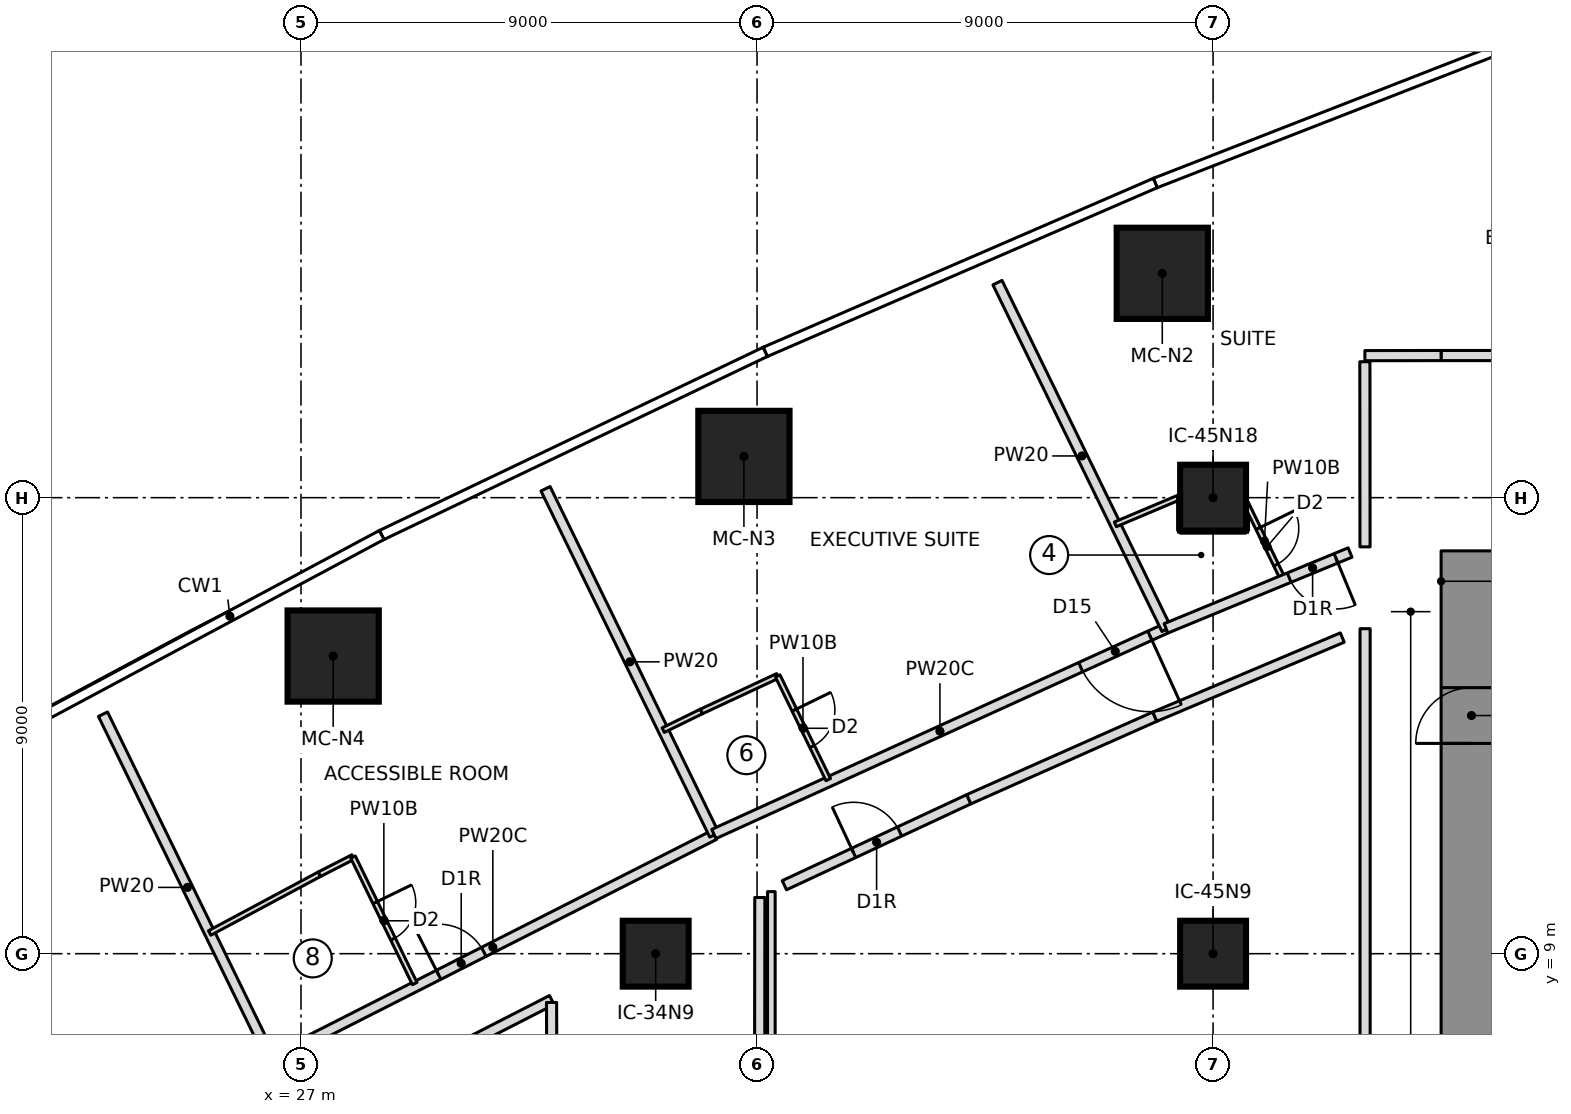
"""IFC4 building model, lengths in metres.
Left out: names, types, materials, properties, quantities, classifications, styles, units other than length and angle.
Written with IfcOpenShell. Run it as: python <this file> out.ifc"""

import sys

from ifc_helpers import new_model, si_unit, direction, frame, frame_2d, origin, origin_2d, place, context, subcontext, project, spatial, rectangle, extrude, element, fill, save


model = new_model("IFC4")
c1 = context("Model", 3, precision=1e-05, world=origin(), true_north=direction((0.0, 1.0)))
c2 = subcontext(c1, "Body", "Model", "MODEL_VIEW")
j1 = project(units=[si_unit("LENGTHUNIT", "METRE"), si_unit("PLANEANGLEUNIT", "RADIAN")], contexts=[c1])
p1 = place(None, origin())
s1 = spatial("IfcSite", under=j1, at=p1, CompositionType="ELEMENT")
p2 = place(p1, origin())
s2 = spatial("IfcBuilding", under=s1, at=p2, CompositionType="ELEMENT")
p3 = place(p2, frame((0.0, 0.0, 64.45)))
s3 = spatial("IfcBuildingStorey", under=s2, at=p3, CompositionType="ELEMENT", Elevation=64.45)
p4 = place(p3, frame((50.1, 6.65, 0.0), z_axis=(0.0, 0.0, 1.0), x_axis=(0.0, 1.0, 0.0)))
e1 = element("IfcWall", 1, at=p4, inside=s3, PredefinedType="SHEAR", context=c2, shape_type="SweptSolid", body=[
    extrude(rectangle(XDim=10.3, YDim=1.2, at=frame_2d((5.15, 0.0))), origin(), (0.0, 0.0, 1.0), 3.55),
])
p5 = place(p4, frame((6.5, 0.0, 0.0)))
e2 = element("IfcOpeningElement", 2, at=p5, cuts=e1, PredefinedType="OPENING", context=c2, shape_type="SweptSolid", body=[
    extrude(rectangle(XDim=1.1, YDim=2.1, at=frame_2d((0.55, 1.05))), frame((0.0, 0.61, 0.0), z_axis=(0.0, -1.0, 0.0), x_axis=(1.0, 0.0, 0.0)), (0.0, 0.0, 1.0), 1.22),
])
for number, where, z_axis, x_axis in (
    (3, (43.998, 22.428, 0.0), (0.0, 0.0, 1.0), (1.0, 0.0, 0.0)),
    (4, (35.741, 18.814, 0.0), (0.0, 0.0, 1.0), (1.0, 0.0, 0.0)),
    (5, (27.635, 14.874, 0.0), (0.0, 0.0, 1.0), (1.0, 0.0, 0.0)),
):
    element("IfcColumn", number, at=place(p3, frame(where, z_axis=z_axis, x_axis=x_axis)), inside=s3, PredefinedType="COLUMN", context=c2, shape_type="SweptSolid", body=[
        extrude(rectangle(XDim=1.8, YDim=1.8, at=origin_2d()), origin(), (0.0, 0.0, 1.0), 3.55),
    ])
for number, where, z_axis, x_axis in (
    (6, (34.0, 9.0, 0.0), (0.0, 0.0, 1.0), (1.0, 0.0, 0.0)),
    (7, (45.0, 9.0, 0.0), (0.0, 0.0, 1.0), (1.0, 0.0, 0.0)),
    (8, (45.0, 18.0, 0.0), (0.0, 0.0, 1.0), (1.0, 0.0, 0.0)),
):
    element("IfcColumn", number, at=place(p3, frame(where, z_axis=z_axis, x_axis=x_axis)), inside=s3, PredefinedType="COLUMN", context=c2, shape_type="SweptSolid", body=[
        extrude(rectangle(XDim=1.3, YDim=1.3, at=origin_2d()), origin(), (0.0, 0.0, 1.0), 3.55),
    ])
p6 = place(p3, frame((26.425, 6.89, 0.0), z_axis=(0.0, 0.0, 1.0), x_axis=(-0.438202895602, 0.898876088394, 0.0)))
e9 = element("IfcWall", 9, at=p6, inside=s3, PredefinedType="PARTITIONING", context=c2, shape_type="SweptSolid", body=[
    extrude(rectangle(XDim=7.605, YDim=0.2, at=frame_2d((3.803, 0.0))), origin(), (0.0, 0.0, 1.0), 3.25),
])
p7 = place(p3, frame((26.417, 6.908, 0.0), z_axis=(0.0, 0.0, 1.0), x_axis=(0.891700643128, 0.452625632334, 0.0)))
e10 = element("IfcWall", 10, at=p7, inside=s3, PredefinedType="PARTITIONING", context=c2, shape_type="SweptSolid", body=[
    extrude(rectangle(XDim=9.801, YDim=0.2, at=frame_2d((4.901, 0.0))), origin(), (0.0, 0.0, 1.0), 3.25),
])
p8 = place(p7, frame((3.7, 0.0, 0.0)))
e11 = element("IfcOpeningElement", 11, at=p8, cuts=e10, PredefinedType="OPENING", context=c2, shape_type="SweptSolid", body=[
    extrude(rectangle(XDim=1.0, YDim=2.1, at=frame_2d((0.5, 1.05))), frame((0.0, 0.11, 0.0), z_axis=(0.0, -1.0, 0.0), x_axis=(1.0, 0.0, 0.0)), (0.0, 0.0, 1.0), 0.22),
])
p9 = place(p3, frame((25.198, 9.409, 0.0), z_axis=(0.0, 0.0, 1.0), x_axis=(0.881658684569, 0.471887660279, 0.0)))
e12 = element("IfcWall", 12, at=p9, inside=s3, PredefinedType="PARTITIONING", context=c2, shape_type="SweptSolid", body=[
    extrude(rectangle(XDim=2.457, YDim=0.1, at=frame_2d((1.228, 0.0))), origin(), (0.0, 0.0, 1.0), 3.25),
])
p10 = place(p3, frame((27.363, 10.568, 0.0), z_axis=(0.0, 0.0, 1.0), x_axis=(0.890195653003, 0.455578422858, 0.0)))
e13 = element("IfcWall", 13, at=p10, inside=s3, PredefinedType="PARTITIONING", context=c2, shape_type="SweptSolid", body=[
    extrude(rectangle(XDim=0.745, YDim=0.1, at=frame_2d((0.373, 0.0))), origin(), (0.0, 0.0, 1.0), 3.25),
])
p11 = place(p3, frame((28.027, 10.907, 0.0), z_axis=(0.0, 0.0, 1.0), x_axis=(0.438189818179, -0.898882463531, 0.0)))
e14 = element("IfcWall", 14, at=p11, inside=s3, PredefinedType="PARTITIONING", context=c2, shape_type="SweptSolid", body=[
    extrude(rectangle(XDim=2.777, YDim=0.1, at=frame_2d((1.389, 0.0))), origin(), (0.0, 0.0, 1.0), 3.25),
])
p12 = place(p11, frame((1.0, 0.0, 0.0)))
e15 = element("IfcOpeningElement", 15, at=p12, cuts=e14, PredefinedType="OPENING", context=c2, shape_type="SweptSolid", body=[
    extrude(rectangle(XDim=0.8, YDim=2.1, at=frame_2d((0.4, 1.05))), frame((0.0, 0.06, 0.0), z_axis=(0.0, -1.0, 0.0), x_axis=(1.0, 0.0, 0.0)), (0.0, 0.0, 1.0), 0.12),
])
p13 = place(p3, frame((35.156, 11.344, 0.0), z_axis=(0.0, 0.0, 1.0), x_axis=(-0.438196407286, 0.898879251425, 0.0)))
e16 = element("IfcWall", 16, at=p13, inside=s3, PredefinedType="PARTITIONING", context=c2, shape_type="SweptSolid", body=[
    extrude(rectangle(XDim=7.6, YDim=0.2, at=frame_2d((3.8, 0.0))), origin(), (0.0, 0.0, 1.0), 3.25),
])
p14 = place(p3, frame((44.072, 15.421, 0.0), z_axis=(0.0, 0.0, 1.0), x_axis=(-0.910287143541, -0.413977434534, 0.0)))
e17 = element("IfcWall", 17, at=p14, inside=s3, PredefinedType="PARTITIONING", context=c2, shape_type="SweptSolid", body=[
    extrude(rectangle(XDim=9.803, YDim=0.2, at=frame_2d((4.902, 0.0))), origin(), (0.0, 0.0, 1.0), 3.25),
])
p15 = place(p14, frame((0.35, 0.0, 0.0)))
e18 = element("IfcOpeningElement", 18, at=p15, cuts=e17, PredefinedType="OPENING", context=c2, shape_type="SweptSolid", body=[
    extrude(rectangle(XDim=1.5, YDim=2.1, at=frame_2d((0.75, 1.05))), frame((0.0, 0.11, 0.0), z_axis=(0.0, -1.0, 0.0), x_axis=(1.0, 0.0, 0.0)), (0.0, 0.0, 1.0), 0.22),
])
p16 = place(p3, frame((34.148, 13.412, 0.0), z_axis=(0.0, 0.0, 1.0), x_axis=(0.89828999443, 0.43940310184, 0.0)))
e19 = element("IfcWall", 19, at=p16, inside=s3, PredefinedType="PARTITIONING", context=c2, shape_type="SweptSolid", body=[
    extrude(rectangle(XDim=0.84, YDim=0.1, at=frame_2d((0.42, 0.0))), origin(), (0.0, 0.0, 1.0), 3.25),
])
p17 = place(p3, frame((34.903, 13.781, 0.0), z_axis=(0.0, 0.0, 1.0), x_axis=(0.906434605418, 0.422346192242, 0.0)))
e20 = element("IfcWall", 20, at=p17, inside=s3, PredefinedType="PARTITIONING", context=c2, shape_type="SweptSolid", body=[
    extrude(rectangle(XDim=1.661, YDim=0.1, at=frame_2d((0.83, 0.0))), origin(), (0.0, 0.0, 1.0), 3.25),
])
p18 = place(p3, frame((36.408, 14.482, 0.0), z_axis=(0.0, 0.0, 1.0), x_axis=(0.438271544149, -0.898842618921, 0.0)))
e21 = element("IfcWall", 21, at=p18, inside=s3, PredefinedType="PARTITIONING", context=c2, shape_type="SweptSolid", body=[
    extrude(rectangle(XDim=2.277, YDim=0.1, at=frame_2d((1.139, 0.0))), origin(), (0.0, 0.0, 1.0), 3.25),
])
p19 = place(p18, frame((0.75, 0.0, 0.0)))
e22 = element("IfcOpeningElement", 22, at=p19, cuts=e21, PredefinedType="OPENING", context=c2, shape_type="SweptSolid", body=[
    extrude(rectangle(XDim=0.8, YDim=2.1, at=frame_2d((0.4, 1.05))), frame((0.0, 0.06, 0.0), z_axis=(0.0, -1.0, 0.0), x_axis=(1.0, 0.0, 0.0)), (0.0, 0.0, 1.0), 0.12),
])
p20 = place(p3, frame((44.08, 15.403, 0.0), z_axis=(0.0, 0.0, 1.0), x_axis=(-0.438196739796, 0.898879089328, 0.0)))
e23 = element("IfcWall", 23, at=p20, inside=s3, PredefinedType="PARTITIONING", context=c2, shape_type="SweptSolid", body=[
    extrude(rectangle(XDim=7.611, YDim=0.2, at=frame_2d((3.806, 0.0))), origin(), (0.0, 0.0, 1.0), 3.25),
])
p21 = place(p3, frame((43.071, 17.473, 0.0), z_axis=(0.0, 0.0, 1.0), x_axis=(0.921313965742, 0.388819465214, 0.0)))
e24 = element("IfcWall", 24, at=p21, inside=s3, PredefinedType="PARTITIONING", context=c2, shape_type="SweptSolid", body=[
    extrude(rectangle(XDim=1.388, YDim=0.1, at=frame_2d((0.694, 0.0))), origin(), (0.0, 0.0, 1.0), 3.25),
])
p22 = place(p3, frame((44.35, 18.013, 0.0), z_axis=(0.0, 0.0, 1.0), x_axis=(0.0, -1.0, 0.0)))
e25 = element("IfcWall", 25, at=p22, inside=s3, PredefinedType="PARTITIONING", context=c2, shape_type="SweptSolid", body=[
    extrude(rectangle(XDim=0.661, YDim=0.1, at=frame_2d((0.331, 0.0))), origin(), (0.0, 0.0, 1.0), 3.25),
])
p23 = place(p3, frame((44.352, 17.35, 0.0), z_axis=(0.0, 0.0, 1.0), x_axis=(1.0, 0.0, 0.0)))
e26 = element("IfcWall", 26, at=p23, inside=s3, PredefinedType="PARTITIONING", context=c2, shape_type="SweptSolid", body=[
    extrude(rectangle(XDim=1.296, YDim=0.1, at=frame_2d((0.648, 0.0))), origin(), (0.0, 0.0, 1.0), 3.25),
])
p24 = place(p3, frame((45.65, 17.352, 0.0), z_axis=(0.0, 0.0, 1.0), x_axis=(0.0, 1.0, 0.0)))
e27 = element("IfcWall", 27, at=p24, inside=s3, PredefinedType="PARTITIONING", context=c2, shape_type="SweptSolid", body=[
    extrude(rectangle(XDim=0.536, YDim=0.1, at=frame_2d((0.268, 0.0))), origin(), (0.0, 0.0, 1.0), 3.25),
])
p25 = place(p3, frame((45.65, 17.888, 0.0), z_axis=(0.0, 0.0, 1.0), x_axis=(0.438301838547, -0.89882784688, 0.0)))
e28 = element("IfcWall", 28, at=p25, inside=s3, PredefinedType="PARTITIONING", context=c2, shape_type="SweptSolid", body=[
    extrude(rectangle(XDim=1.659, YDim=0.1, at=frame_2d((0.829, 0.0))), origin(), (0.0, 0.0, 1.0), 3.25),
])
p26 = place(p25, frame((0.55, 0.0, 0.0)))
e29 = element("IfcOpeningElement", 29, at=p26, cuts=e28, PredefinedType="OPENING", context=c2, shape_type="SweptSolid", body=[
    extrude(rectangle(XDim=0.8, YDim=2.1, at=frame_2d((0.4, 1.05))), frame((0.0, 0.06, 0.0), z_axis=(0.0, -1.0, 0.0), x_axis=(1.0, 0.0, 0.0)), (0.0, 0.0, 1.0), 0.12),
])
p27 = place(p3, frame((29.357, 6.758, 0.0), z_axis=(0.0, 0.0, 1.0), x_axis=(0.890213377055, 0.455543788579, 0.0)))
e30 = element("IfcWall", 30, at=p27, inside=s3, PredefinedType="PARTITIONING", context=c2, shape_type="SweptSolid", body=[
    extrude(rectangle(XDim=2.912, YDim=0.2, at=frame_2d((1.456, 0.0))), origin(), (0.0, 0.0, 1.0), 3.25),
])
p28 = place(p3, frame((36.283, -10.225, 0.0), z_axis=(0.0, 0.0, 1.0), x_axis=(0.0, 1.0, 0.0)))
e31 = element("IfcWall", 31, at=p28, inside=s3, PredefinedType="PARTITIONING", context=c2, shape_type="SweptSolid", body=[
    extrude(rectangle(XDim=20.45, YDim=0.15, at=frame_2d((10.225, 0.0))), origin(), (0.0, 0.0, 1.0), 3.25),
])
p29 = place(p3, frame((36.54, 10.351, 0.0), z_axis=(0.0, 0.0, 1.0), x_axis=(0.906347708834, 0.42253263861, 0.0)))
e32 = element("IfcWall", 32, at=p29, inside=s3, PredefinedType="PARTITIONING", context=c2, shape_type="SweptSolid", body=[
    extrude(rectangle(XDim=4.016, YDim=0.2, at=frame_2d((2.008, 0.0))), origin(), (0.0, 0.0, 1.0), 3.25),
])
p30 = place(p29, frame((1.508, 0.0, 0.0)))
e33 = element("IfcOpeningElement", 33, at=p30, cuts=e32, PredefinedType="OPENING", context=c2, shape_type="SweptSolid", body=[
    extrude(rectangle(XDim=1.0, YDim=2.1, at=frame_2d((0.5, 1.05))), frame((0.0, 0.11, 0.0), z_axis=(0.0, -1.0, 0.0), x_axis=(1.0, 0.0, 0.0)), (0.0, 0.0, 1.0), 0.22),
])
p31 = place(p3, frame((40.18, 12.048, 0.0), z_axis=(0.0, 0.0, 1.0), x_axis=(0.913986953061, 0.405743576209, 0.0)))
e34 = element("IfcWall", 34, at=p31, inside=s3, PredefinedType="PARTITIONING", context=c2, shape_type="SweptSolid", body=[
    extrude(rectangle(XDim=4.016, YDim=0.2, at=frame_2d((2.008, 0.0))), origin(), (0.0, 0.0, 1.0), 3.25),
])
p32 = place(p3, frame((43.85, 13.677, 0.0), z_axis=(0.0, 0.0, 1.0), x_axis=(0.921269894054, 0.388923877269, 0.0)))
e35 = element("IfcWall", 35, at=p32, inside=s3, PredefinedType="PARTITIONING", context=c2, shape_type="SweptSolid", body=[
    extrude(rectangle(XDim=4.016, YDim=0.2, at=frame_2d((2.008, 0.0))), origin(), (0.0, 0.0, 1.0), 3.25),
])
p33 = place(p3, frame((54.597, 20.805, 0.0), z_axis=(0.0, 0.0, 1.0), x_axis=(-1.0, 0.0, 0.0)))
e36 = element("IfcWall", 36, at=p33, inside=s3, PredefinedType="PARTITIONING", context=c2, shape_type="SweptSolid", body=[
    extrude(rectangle(XDim=5.097, YDim=0.2, at=frame_2d((2.548, 0.0))), origin(), (0.0, 0.0, 1.0), 3.25),
])
p34 = place(p33, frame((2.048, 0.0, 0.0)))
e37 = element("IfcOpeningElement", 37, at=p34, cuts=e36, PredefinedType="OPENING", context=c2, shape_type="SweptSolid", body=[
    extrude(rectangle(XDim=1.5, YDim=2.1, at=frame_2d((0.75, 1.05))), frame((0.0, 0.11, 0.0), z_axis=(0.0, -1.0, 0.0), x_axis=(1.0, 0.0, 0.0)), (0.0, 0.0, 1.0), 0.22),
])
p35 = place(p3, frame((47.704, 16.917, 0.0), z_axis=(0.0, 0.0, 1.0), x_axis=(-0.924573816857, -0.381002962169, 0.0)))
e38 = element("IfcWall", 38, at=p35, inside=s3, PredefinedType="PARTITIONING", context=c2, shape_type="SweptSolid", body=[
    extrude(rectangle(XDim=3.929, YDim=0.2, at=frame_2d((1.964, 0.0))), origin(), (0.0, 0.0, 1.0), 3.25),
])
p36 = place(p35, frame((0.3, 0.0, 0.0)))
e39 = element("IfcOpeningElement", 39, at=p36, cuts=e38, PredefinedType="OPENING", context=c2, shape_type="SweptSolid", body=[
    extrude(rectangle(XDim=1.0, YDim=2.1, at=frame_2d((0.5, 1.05))), frame((0.0, 0.11, 0.0), z_axis=(0.0, -1.0, 0.0), x_axis=(1.0, 0.0, 0.0)), (0.0, 0.0, 1.0), 0.22),
])
p37 = place(p3, frame((31.945, 8.037, 0.0), z_axis=(0.0, 0.0, 1.0), x_axis=(0.003129875123, -0.999995101929, 0.0)))
e40 = element("IfcWall", 40, at=p37, inside=s3, PredefinedType="PARTITIONING", context=c2, shape_type="SweptSolid", body=[
    extrude(rectangle(XDim=1.092, YDim=0.2, at=frame_2d((0.546, 0.0))), origin(), (0.0, 0.0, 1.0), 3.25),
])
p38 = place(p3, frame((36.052, 6.986, 0.0), z_axis=(0.0, 0.0, 1.0), x_axis=(0.000781799464, 0.999999694395, 0.0)))
e41 = element("IfcWall", 41, at=p38, inside=s3, PredefinedType="PARTITIONING", context=c2, shape_type="SweptSolid", body=[
    extrude(rectangle(XDim=3.123, YDim=0.2, at=frame_2d((1.562, 0.0))), origin(), (0.0, 0.0, 1.0), 3.25),
])
p39 = place(p3, frame((48.0, 15.414, 0.0), z_axis=(0.0, 0.0, 1.0), x_axis=(0.0, -1.0, 0.0)))
e42 = element("IfcWall", 42, at=p39, inside=s3, PredefinedType="PARTITIONING", context=c2, shape_type="SweptSolid", body=[
    extrude(rectangle(XDim=30.828, YDim=0.2, at=frame_2d((15.414, 0.0))), origin(), (0.0, 0.0, 1.0), 3.25),
])
p40 = place(p3, frame((49.5, 20.805, 0.0), z_axis=(0.0, 0.0, 1.0), x_axis=(-0.999998933031, -0.001460800259, 0.0)))
e43 = element("IfcWall", 43, at=p40, inside=s3, PredefinedType="PARTITIONING", context=c2, shape_type="SweptSolid", body=[
    extrude(rectangle(XDim=1.504, YDim=0.2, at=frame_2d((0.752, 0.0))), origin(), (0.0, 0.0, 1.0), 3.25),
])
p41 = place(p3, frame((47.996, 20.683, 0.0), z_axis=(0.0, 0.0, 1.0), x_axis=(0.000801763623, -0.999999678587, 0.0)))
e44 = element("IfcWall", 44, at=p41, inside=s3, PredefinedType="PARTITIONING", context=c2, shape_type="SweptSolid", body=[
    extrude(rectangle(XDim=3.654, YDim=0.2, at=frame_2d((1.827, 0.0))), origin(), (0.0, 0.0, 1.0), 3.25),
])
p42 = place(p12, origin())
e45 = element("IfcDoor", 45, at=p42, inside=s3, OperationType="SINGLE_SWING_LEFT", PredefinedType="DOOR", context=c2, shape_type="SweptSolid", body=[
    extrude(rectangle(XDim=0.8, YDim=2.1, at=frame_2d((0.4, 1.05))), frame((0.0, 0.025, 0.0), z_axis=(0.0, -1.0, 0.0), x_axis=(1.0, 0.0, 0.0)), (0.0, 0.0, 1.0), 0.05),
])
fill(e15, e45)
p43 = place(p8, origin())
e46 = element("IfcDoor", 46, at=p43, inside=s3, OperationType="SINGLE_SWING_RIGHT", PredefinedType="DOOR", context=c2, shape_type="SweptSolid", body=[
    extrude(rectangle(XDim=1.0, YDim=2.1, at=frame_2d((0.5, 1.05))), frame((0.0, 0.025, 0.0), z_axis=(0.0, -1.0, 0.0), x_axis=(1.0, 0.0, 0.0)), (0.0, 0.0, 1.0), 0.05),
])
fill(e11, e46)
p44 = place(p19, origin())
e47 = element("IfcDoor", 47, at=p44, inside=s3, OperationType="SINGLE_SWING_LEFT", PredefinedType="DOOR", context=c2, shape_type="SweptSolid", body=[
    extrude(rectangle(XDim=0.8, YDim=2.1, at=frame_2d((0.4, 1.05))), frame((0.0, 0.025, 0.0), z_axis=(0.0, -1.0, 0.0), x_axis=(1.0, 0.0, 0.0)), (0.0, 0.0, 1.0), 0.05),
])
fill(e22, e47)
p45 = place(p15, origin())
e48 = element("IfcDoor", 48, at=p45, inside=s3, OperationType="DOUBLE_DOOR_SINGLE_SWING", PredefinedType="DOOR", context=c2, shape_type="SweptSolid", body=[
    extrude(rectangle(XDim=1.5, YDim=2.1, at=frame_2d((0.75, 1.05))), frame((0.0, 0.025, 0.0), z_axis=(0.0, -1.0, 0.0), x_axis=(1.0, 0.0, 0.0)), (0.0, 0.0, 1.0), 0.05),
])
fill(e18, e48)
p46 = place(p26, origin())
e49 = element("IfcDoor", 49, at=p46, inside=s3, OperationType="SINGLE_SWING_LEFT", PredefinedType="DOOR", context=c2, shape_type="SweptSolid", body=[
    extrude(rectangle(XDim=0.8, YDim=2.1, at=frame_2d((0.4, 1.05))), frame((0.0, 0.025, 0.0), z_axis=(0.0, -1.0, 0.0), x_axis=(1.0, 0.0, 0.0)), (0.0, 0.0, 1.0), 0.05),
])
fill(e29, e49)
p47 = place(p36, origin())
e50 = element("IfcDoor", 50, at=p47, inside=s3, OperationType="SINGLE_SWING_RIGHT", PredefinedType="DOOR", context=c2, shape_type="SweptSolid", body=[
    extrude(rectangle(XDim=1.0, YDim=2.1, at=frame_2d((0.5, 1.05))), frame((0.0, 0.025, 0.0), z_axis=(0.0, -1.0, 0.0), x_axis=(1.0, 0.0, 0.0)), (0.0, 0.0, 1.0), 0.05),
])
fill(e39, e50)
p48 = place(p30, origin())
e51 = element("IfcDoor", 51, at=p48, inside=s3, OperationType="SINGLE_SWING_RIGHT", PredefinedType="DOOR", context=c2, shape_type="SweptSolid", body=[
    extrude(rectangle(XDim=1.0, YDim=2.1, at=frame_2d((0.5, 1.05))), frame((0.0, 0.025, 0.0), z_axis=(0.0, -1.0, 0.0), x_axis=(1.0, 0.0, 0.0)), (0.0, 0.0, 1.0), 0.05),
])
fill(e33, e51)
p49 = place(p5, origin())
e52 = element("IfcDoor", 52, at=p49, inside=s3, OperationType="SINGLE_SWING_RIGHT", PredefinedType="DOOR", context=c2, shape_type="SweptSolid", body=[
    extrude(rectangle(XDim=1.1, YDim=2.1, at=frame_2d((0.55, 1.05))), frame((0.0, 0.025, 0.0), z_axis=(0.0, -1.0, 0.0), x_axis=(1.0, 0.0, 0.0)), (0.0, 0.0, 1.0), 0.05),
])
fill(e2, e52)
save(model, sys.argv[1])
